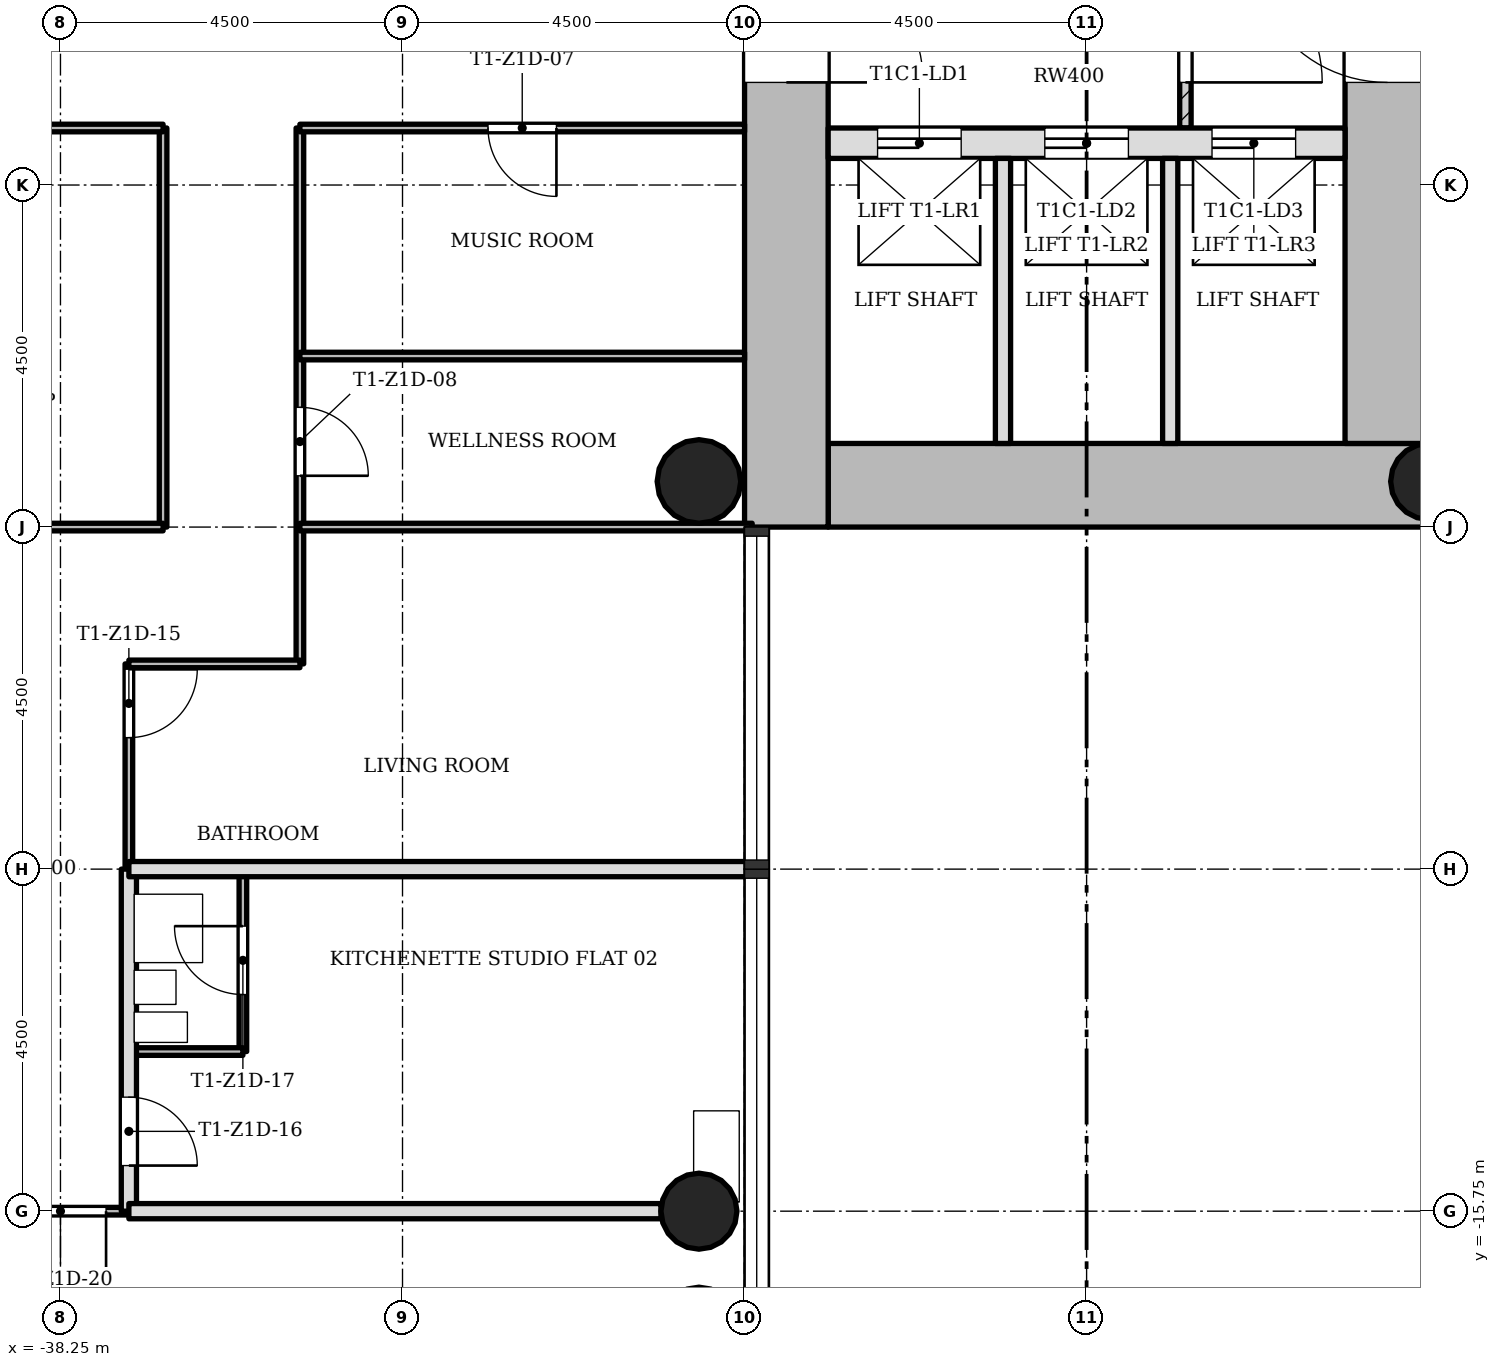
"""IFC4 building model, lengths in metres.
Left out: names, types, materials, properties, quantities, classifications, styles, units other than length and angle.
Written with IfcOpenShell. Run it as: python <this file> out.ifc"""

import sys

from ifc_helpers import new_model, si_unit, direction, frame, frame_2d, origin, origin_2d, place, context, subcontext, project, spatial, rectangle, hollow_circle, extrude, element, fill, save


model = new_model("IFC4")
c1 = context("Model", 3, precision=1e-05, world=origin(), true_north=direction((0.0, 1.0)))
c2 = subcontext(c1, "Body", "Model", "MODEL_VIEW")
j1 = project(units=[si_unit("LENGTHUNIT", "METRE"), si_unit("PLANEANGLEUNIT", "RADIAN")], contexts=[c1])
p1 = place(None, origin())
s1 = spatial("IfcSite", under=j1, at=p1, CompositionType="ELEMENT")
p2 = place(p1, origin())
s2 = spatial("IfcBuilding", under=s1, at=p2, CompositionType="ELEMENT")
p3 = place(p2, frame((0.0, 0.0, 61.9)))
s3 = spatial("IfcBuildingStorey", under=s2, at=p3, CompositionType="ELEMENT", Elevation=61.9)
p4 = place(p3, frame((-28.15, -6.2, 0.0), z_axis=(0.0, 0.0, 1.0), x_axis=(1.0, 0.0, 0.0)))
e1 = element("IfcWall", 1, at=p4, inside=s3, PredefinedType="SHEAR", context=c2, shape_type="SweptSolid", body=[
    extrude(rectangle(XDim=7.9, YDim=1.1, at=frame_2d((3.95, 0.0))), origin(), (0.0, 0.0, 1.0), 3.4),
])
p5 = place(p3, frame((-20.8, -5.65, 0.0), z_axis=(0.0, 0.0, 1.0), x_axis=(0.0, 1.0, 0.0)))
e2 = element("IfcWall", 2, at=p5, inside=s3, PredefinedType="SHEAR", context=c2, shape_type="SweptSolid", body=[
    extrude(rectangle(XDim=12.4, YDim=1.1, at=frame_2d((6.2, 0.0))), origin(), (0.0, 0.0, 1.0), 3.4),
])
p6 = place(p5, frame((4.75, 0.0, 0.0)))
e3 = element("IfcOpeningElement", 3, at=p6, cuts=e2, PredefinedType="OPENING", context=c2, shape_type="SweptSolid", body=[
    extrude(rectangle(XDim=1.8, YDim=2.1, at=frame_2d((0.9, 1.05))), frame((0.0, 0.56, 0.0), z_axis=(0.0, -1.0, 0.0), x_axis=(1.0, 0.0, 0.0)), (0.0, 0.0, 1.0), 1.12),
])
p7 = place(p3, frame((-28.7, 5.65, 0.0), z_axis=(0.0, 0.0, 1.0), x_axis=(0.0, -1.0, 0.0)))
e4 = element("IfcWall", 4, at=p7, inside=s3, PredefinedType="SHEAR", context=c2, shape_type="SweptSolid", body=[
    extrude(rectangle(XDim=12.4, YDim=1.1, at=frame_2d((6.2, 0.0))), origin(), (0.0, 0.0, 1.0), 3.4),
])
p8 = place(p7, frame((4.75, 0.0, 0.0)))
e5 = element("IfcOpeningElement", 5, at=p8, cuts=e4, PredefinedType="OPENING", context=c2, shape_type="SweptSolid", body=[
    extrude(rectangle(XDim=1.8, YDim=2.1, at=frame_2d((0.9, 1.05))), frame((0.0, 0.56, 0.0), z_axis=(0.0, -1.0, 0.0), x_axis=(1.0, 0.0, 0.0)), (0.0, 0.0, 1.0), 1.12),
])
p9 = place(p3, frame((-28.15, -1.7, 0.0), z_axis=(0.0, 0.0, 1.0), x_axis=(1.0, 0.0, 0.0)))
e6 = element("IfcWall", 6, at=p9, inside=s3, PredefinedType="SHEAR", context=c2, shape_type="SweptSolid", body=[
    extrude(rectangle(XDim=6.8, YDim=0.4, at=frame_2d((3.4, 0.0))), origin(), (0.0, 0.0, 1.0), 3.4),
])
p10 = place(p9, frame((0.65, 0.0, 0.0)))
e7 = element("IfcOpeningElement", 7, at=p10, cuts=e6, PredefinedType="OPENING", context=c2, shape_type="SweptSolid", body=[
    extrude(rectangle(XDim=1.1, YDim=2.1, at=frame_2d((0.55, 1.05))), frame((0.0, 0.21, 0.0), z_axis=(0.0, -1.0, 0.0), x_axis=(1.0, 0.0, 0.0)), (0.0, 0.0, 1.0), 0.42),
])
p11 = place(p9, frame((2.85, 0.0, 0.0)))
e8 = element("IfcOpeningElement", 8, at=p11, cuts=e6, PredefinedType="OPENING", context=c2, shape_type="SweptSolid", body=[
    extrude(rectangle(XDim=1.1, YDim=2.1, at=frame_2d((0.55, 1.05))), frame((0.0, 0.21, 0.0), z_axis=(0.0, -1.0, 0.0), x_axis=(1.0, 0.0, 0.0)), (0.0, 0.0, 1.0), 0.42),
])
p12 = place(p9, frame((5.05, 0.0, 0.0)))
e9 = element("IfcOpeningElement", 9, at=p12, cuts=e6, PredefinedType="OPENING", context=c2, shape_type="SweptSolid", body=[
    extrude(rectangle(XDim=1.1, YDim=2.1, at=frame_2d((0.55, 1.05))), frame((0.0, 0.21, 0.0), z_axis=(0.0, -1.0, 0.0), x_axis=(1.0, 0.0, 0.0)), (0.0, 0.0, 1.0), 0.42),
])
for number, where, z_axis, x_axis in (
    (10, (-20.25, -6.15, 0.0), (0.0, 0.0, 1.0), (1.0, 0.0, 0.0)),
    (11, (-29.85, -15.75, 0.0), (0.0, 0.0, 1.0), (1.0, 0.0, 0.0)),
):
    element("IfcColumn", number, at=place(p3, frame(where, z_axis=z_axis, x_axis=x_axis)), inside=s3, PredefinedType="COLUMN", context=c2, shape_type="SweptSolid", body=[
        extrude(hollow_circle(Radius=0.5, WallThickness=0.036, at=origin_2d()), origin(), (0.0, 0.0, 1.0), 3.4),
    ])
p13 = place(p3, frame((-29.85, -6.15, 0.0), z_axis=(0.0, 0.0, 1.0), x_axis=(1.0, 0.0, 0.0)))
e12 = element("IfcColumn", 12, at=p13, inside=s3, PredefinedType="COLUMN", context=c2, shape_type="SweptSolid", body=[
    extrude(hollow_circle(Radius=0.55, WallThickness=0.04, at=origin_2d()), origin(), (0.0, 0.0, 1.0), 3.4),
])
p14 = place(p3, frame((-23.45, -1.5, 0.0), z_axis=(0.0, 0.0, 1.0), x_axis=(0.0, 1.0, 0.0)))
e13 = element("IfcWall", 13, at=p14, inside=s3, PredefinedType="PARTITIONING", context=c2, shape_type="SweptSolid", body=[
    extrude(rectangle(XDim=3.0, YDim=0.15, at=frame_2d((1.5, 0.0))), origin(), (0.0, 0.0, 1.0), 3.0),
])
p15 = place(p14, frame((0.6, 0.0, 0.0)))
e14 = element("IfcOpeningElement", 14, at=p15, cuts=e13, PredefinedType="OPENING", context=c2, shape_type="SweptSolid", body=[
    extrude(rectangle(XDim=1.8, YDim=2.1, at=frame_2d((0.9, 1.05))), frame((0.0, 0.085, 0.0), z_axis=(0.0, -1.0, 0.0), x_axis=(1.0, 0.0, 0.0)), (0.0, 0.0, 1.0), 0.17),
])
for number, where, z_axis, x_axis in (
    (15, (-25.85, -5.65, 0.0), (0.0, 0.0, 1.0), (0.0, 1.0, 0.0)),
    (16, (-23.65, -5.65, 0.0), (0.0, 0.0, 1.0), (0.0, 1.0, 0.0)),
):
    element("IfcWall", number, at=place(p3, frame(where, z_axis=z_axis, x_axis=x_axis)), inside=s3, PredefinedType="SOLIDWALL", context=c2, shape_type="SweptSolid", body=[
        extrude(rectangle(XDim=3.75, YDim=0.2, at=frame_2d((1.875, 0.0))), origin(), (0.0, 0.0, 1.0), 3.0),
    ])
p16 = place(p3, frame((-37.35, -11.25, 0.0), z_axis=(0.0, 0.0, 1.0), x_axis=(0.0, 1.0, 0.0)))
e17 = element("IfcWall", 17, at=p16, inside=s3, PredefinedType="PARTITIONING", context=c2, shape_type="SweptSolid", body=[
    extrude(rectangle(XDim=2.7, YDim=0.1, at=frame_2d((1.35, 0.0))), origin(), (0.0, 0.0, 1.0), 3.0),
])
p17 = place(p16, frame((1.73, 0.0, 0.0)))
e18 = element("IfcOpeningElement", 18, at=p17, cuts=e17, PredefinedType="OPENING", context=c2, shape_type="SweptSolid", body=[
    extrude(rectangle(XDim=0.9, YDim=2.1, at=frame_2d((0.45, 1.05))), frame((0.0, 0.06, 0.0), z_axis=(0.0, -1.0, 0.0), x_axis=(1.0, 0.0, 0.0)), (0.0, 0.0, 1.0), 0.12),
])
p18 = place(p3, frame((-37.35, -15.75, 0.0), z_axis=(0.0, 0.0, 1.0), x_axis=(0.0, 1.0, 0.0)))
e19 = element("IfcWall", 19, at=p18, inside=s3, PredefinedType="SOLIDWALL", context=c2, shape_type="SweptSolid", body=[
    extrude(rectangle(XDim=4.5, YDim=0.2, at=frame_2d((2.25, 0.0))), origin(), (0.0, 0.0, 1.0), 3.0),
])
p19 = place(p18, frame((0.6, 0.0, 0.0)))
e20 = element("IfcOpeningElement", 20, at=p19, cuts=e19, PredefinedType="OPENING", context=c2, shape_type="SweptSolid", body=[
    extrude(rectangle(XDim=0.9, YDim=2.1, at=frame_2d((0.45, 1.05))), frame((0.0, 0.11, 0.0), z_axis=(0.0, -1.0, 0.0), x_axis=(1.0, 0.0, 0.0)), (0.0, 0.0, 1.0), 0.22),
])
p20 = place(p3, frame((-36.9, -6.75, 0.0), z_axis=(0.0, 0.0, 1.0), x_axis=(0.0, 1.0, 0.0)))
e21 = element("IfcWall", 21, at=p20, inside=s3, PredefinedType="PARTITIONING", context=c2, shape_type="SweptSolid", body=[
    extrude(rectangle(XDim=5.25, YDim=0.1, at=frame_2d((2.625, 0.0))), origin(), (0.0, 0.0, 1.0), 3.0),
])
p21 = place(p3, frame((-35.85, -13.65, 0.0), z_axis=(0.0, 0.0, 1.0), x_axis=(0.0, 1.0, 0.0)))
e22 = element("IfcWall", 22, at=p21, inside=s3, PredefinedType="PARTITIONING", context=c2, shape_type="SweptSolid", body=[
    extrude(rectangle(XDim=2.4, YDim=0.1, at=frame_2d((1.2, 0.0))), origin(), (0.0, 0.0, 1.0), 3.0),
])
p22 = place(p21, frame((0.75, 0.0, 0.0)))
e23 = element("IfcOpeningElement", 23, at=p22, cuts=e22, PredefinedType="OPENING", context=c2, shape_type="SweptSolid", body=[
    extrude(rectangle(XDim=0.9, YDim=2.1, at=frame_2d((0.45, 1.05))), frame((0.0, 0.06, 0.0), z_axis=(0.0, -1.0, 0.0), x_axis=(1.0, 0.0, 0.0)), (0.0, 0.0, 1.0), 0.12),
])
p23 = place(p3, frame((-35.1, -8.55, 0.0), z_axis=(0.0, 0.0, 1.0), x_axis=(0.0, 1.0, 0.0)))
e24 = element("IfcWall", 24, at=p23, inside=s3, PredefinedType="PARTITIONING", context=c2, shape_type="SweptSolid", body=[
    extrude(rectangle(XDim=7.05, YDim=0.1, at=frame_2d((3.525, 0.0))), origin(), (0.0, 0.0, 1.0), 3.0),
])
p24 = place(p23, frame((2.475, 0.0, 0.0)))
e25 = element("IfcOpeningElement", 25, at=p24, cuts=e24, PredefinedType="OPENING", context=c2, shape_type="SweptSolid", body=[
    extrude(rectangle(XDim=0.9, YDim=2.1, at=frame_2d((0.45, 1.05))), frame((0.0, 0.06, 0.0), z_axis=(0.0, -1.0, 0.0), x_axis=(1.0, 0.0, 0.0)), (0.0, 0.0, 1.0), 0.12),
])
p25 = place(p3, frame((-41.65, -15.75, 0.0), z_axis=(0.0, 0.0, 1.0), x_axis=(1.0, 0.0, 0.0)))
e26 = element("IfcWall", 26, at=p25, inside=s3, PredefinedType="PARTITIONING", context=c2, shape_type="SweptSolid", body=[
    extrude(rectangle(XDim=4.3, YDim=0.1, at=frame_2d((2.15, 0.0))), origin(), (0.0, 0.0, 1.0), 3.0),
])
p26 = place(p25, frame((2.8, 0.0, 0.0)))
e27 = element("IfcOpeningElement", 27, at=p26, cuts=e26, PredefinedType="OPENING", context=c2, shape_type="SweptSolid", body=[
    extrude(rectangle(XDim=1.2, YDim=2.1, at=frame_2d((0.6, 1.05))), frame((0.0, 0.06, 0.0), z_axis=(0.0, -1.0, 0.0), x_axis=(1.0, 0.0, 0.0)), (0.0, 0.0, 1.0), 0.12),
])
p27 = place(p3, frame((-37.35, -15.75, 0.0), z_axis=(0.0, 0.0, 1.0), x_axis=(1.0, 0.0, 0.0)))
e28 = element("IfcWall", 28, at=p27, inside=s3, PredefinedType="SOLIDWALL", context=c2, shape_type="SweptSolid", body=[
    extrude(rectangle(XDim=7.0, YDim=0.2, at=frame_2d((3.5, 0.0))), origin(), (0.0, 0.0, 1.0), 3.0),
])
p28 = place(p3, frame((-37.35, -13.65, 0.0), z_axis=(0.0, 0.0, 1.0), x_axis=(1.0, 0.0, 0.0)))
e29 = element("IfcWall", 29, at=p28, inside=s3, PredefinedType="PARTITIONING", context=c2, shape_type="SweptSolid", body=[
    extrude(rectangle(XDim=1.5, YDim=0.1, at=frame_2d((0.75, 0.0))), origin(), (0.0, 0.0, 1.0), 3.0),
])
p29 = place(p3, frame((-37.35, -11.25, 0.0), z_axis=(0.0, 0.0, 1.0), x_axis=(1.0, 0.0, 0.0)))
e30 = element("IfcWall", 30, at=p29, inside=s3, PredefinedType="SOLIDWALL", context=c2, shape_type="SweptSolid", body=[
    extrude(rectangle(XDim=8.2, YDim=0.2, at=frame_2d((4.1, 0.0))), origin(), (0.0, 0.0, 1.0), 3.0),
])
p30 = place(p3, frame((-37.35, -8.55, 0.0), z_axis=(0.0, 0.0, 1.0), x_axis=(1.0, 0.0, 0.0)))
e31 = element("IfcWall", 31, at=p30, inside=s3, PredefinedType="PARTITIONING", context=c2, shape_type="SweptSolid", body=[
    extrude(rectangle(XDim=2.25, YDim=0.1, at=frame_2d((1.125, 0.0))), origin(), (0.0, 0.0, 1.0), 3.0),
])
for number, where, z_axis, x_axis in (
    (32, (-42.85, -6.75, 0.0), (0.0, 0.0, 1.0), (1.0, 0.0, 0.0)),
    (33, (-35.1, -6.75, 0.0), (0.0, 0.0, 1.0), (1.0, 0.0, 0.0)),
):
    element("IfcWall", number, at=place(p3, frame(where, z_axis=z_axis, x_axis=x_axis)), inside=s3, PredefinedType="PARTITIONING", context=c2, shape_type="SweptSolid", body=[
        extrude(rectangle(XDim=5.95, YDim=0.1, at=frame_2d((2.975, 0.0))), origin(), (0.0, 0.0, 1.0), 3.0),
    ])
p31 = place(p3, frame((-35.1, -4.5, 0.0), z_axis=(0.0, 0.0, 1.0), x_axis=(1.0, 0.0, 0.0)))
e34 = element("IfcWall", 34, at=p31, inside=s3, PredefinedType="PARTITIONING", context=c2, shape_type="SweptSolid", body=[
    extrude(rectangle(XDim=5.85, YDim=0.1, at=frame_2d((2.925, 0.0))), origin(), (0.0, 0.0, 1.0), 3.0),
])
p32 = place(p3, frame((-42.75, -1.5, 0.0), z_axis=(0.0, 0.0, 1.0), x_axis=(1.0, 0.0, 0.0)))
e35 = element("IfcWall", 35, at=p32, inside=s3, PredefinedType="PARTITIONING", context=c2, shape_type="SweptSolid", body=[
    extrude(rectangle(XDim=5.85, YDim=0.1, at=frame_2d((2.925, 0.0))), origin(), (0.0, 0.0, 1.0), 3.0),
])
p33 = place(p32, frame((2.475, 0.0, 0.0)))
e36 = element("IfcOpeningElement", 36, at=p33, cuts=e35, PredefinedType="OPENING", context=c2, shape_type="SweptSolid", body=[
    extrude(rectangle(XDim=0.9, YDim=2.1, at=frame_2d((0.45, 1.05))), frame((0.0, 0.06, 0.0), z_axis=(0.0, -1.0, 0.0), x_axis=(1.0, 0.0, 0.0)), (0.0, 0.0, 1.0), 0.12),
])
p34 = place(p3, frame((-35.1, -1.5, 0.0), z_axis=(0.0, 0.0, 1.0), x_axis=(1.0, 0.0, 0.0)))
e37 = element("IfcWall", 37, at=p34, inside=s3, PredefinedType="PARTITIONING", context=c2, shape_type="SweptSolid", body=[
    extrude(rectangle(XDim=5.85, YDim=0.1, at=frame_2d((2.925, 0.0))), origin(), (0.0, 0.0, 1.0), 3.0),
])
p35 = place(p34, frame((2.475, 0.0, 0.0)))
e38 = element("IfcOpeningElement", 38, at=p35, cuts=e37, PredefinedType="OPENING", context=c2, shape_type="SweptSolid", body=[
    extrude(rectangle(XDim=0.9, YDim=2.1, at=frame_2d((0.45, 1.05))), frame((0.0, 0.06, 0.0), z_axis=(0.0, -1.0, 0.0), x_axis=(1.0, 0.0, 0.0)), (0.0, 0.0, 1.0), 0.12),
])
p36 = place(p15, origin())
e39 = element("IfcDoor", 39, at=p36, inside=s3, OperationType="SINGLE_SWING_LEFT", PredefinedType="DOOR", context=c2, shape_type="SweptSolid", body=[
    extrude(rectangle(XDim=1.8, YDim=2.1, at=frame_2d((0.9, 1.05))), frame((0.0, 0.025, 0.0), z_axis=(0.0, -1.0, 0.0), x_axis=(1.0, 0.0, 0.0)), (0.0, 0.0, 1.0), 0.05),
])
fill(e14, e39)
p37 = place(p35, origin())
e40 = element("IfcDoor", 40, at=p37, inside=s3, OperationType="SINGLE_SWING_RIGHT", PredefinedType="DOOR", context=c2, shape_type="SweptSolid", body=[
    extrude(rectangle(XDim=0.9, YDim=2.1, at=frame_2d((0.45, 1.05))), frame((0.0, 0.025, 0.0), z_axis=(0.0, -1.0, 0.0), x_axis=(1.0, 0.0, 0.0)), (0.0, 0.0, 1.0), 0.05),
])
fill(e38, e40)
p38 = place(p24, origin())
e41 = element("IfcDoor", 41, at=p38, inside=s3, OperationType="SINGLE_SWING_LEFT", PredefinedType="DOOR", context=c2, shape_type="SweptSolid", body=[
    extrude(rectangle(XDim=0.9, YDim=2.1, at=frame_2d((0.45, 1.05))), frame((0.0, 0.025, 0.0), z_axis=(0.0, -1.0, 0.0), x_axis=(1.0, 0.0, 0.0)), (0.0, 0.0, 1.0), 0.05),
])
fill(e25, e41)
p39 = place(p17, origin())
e42 = element("IfcDoor", 42, at=p39, inside=s3, OperationType="SINGLE_SWING_RIGHT", PredefinedType="DOOR", context=c2, shape_type="SweptSolid", body=[
    extrude(rectangle(XDim=0.9, YDim=2.1, at=frame_2d((0.45, 1.05))), frame((0.0, 0.025, 0.0), z_axis=(0.0, -1.0, 0.0), x_axis=(1.0, 0.0, 0.0)), (0.0, 0.0, 1.0), 0.05),
])
fill(e18, e42)
p40 = place(p19, origin())
e43 = element("IfcDoor", 43, at=p40, inside=s3, OperationType="SINGLE_SWING_LEFT", PredefinedType="DOOR", context=c2, shape_type="SweptSolid", body=[
    extrude(rectangle(XDim=0.9, YDim=2.1, at=frame_2d((0.45, 1.05))), frame((0.0, 0.025, 0.0), z_axis=(0.0, -1.0, 0.0), x_axis=(1.0, 0.0, 0.0)), (0.0, 0.0, 1.0), 0.05),
])
fill(e20, e43)
p41 = place(p22, origin())
e44 = element("IfcDoor", 44, at=p41, inside=s3, OperationType="SINGLE_SWING_LEFT", PredefinedType="DOOR", context=c2, shape_type="SweptSolid", body=[
    extrude(rectangle(XDim=0.9, YDim=2.1, at=frame_2d((0.45, 1.05))), frame((0.0, 0.025, 0.0), z_axis=(0.0, -1.0, 0.0), x_axis=(1.0, 0.0, 0.0)), (0.0, 0.0, 1.0), 0.05),
])
fill(e23, e44)
p42 = place(p26, origin())
e45 = element("IfcDoor", 45, at=p42, inside=s3, OperationType="SINGLE_SWING_RIGHT", PredefinedType="DOOR", context=c2, shape_type="SweptSolid", body=[
    extrude(rectangle(XDim=1.2, YDim=2.1, at=frame_2d((0.6, 1.05))), frame((0.0, 0.025, 0.0), z_axis=(0.0, -1.0, 0.0), x_axis=(1.0, 0.0, 0.0)), (0.0, 0.0, 1.0), 0.05),
])
fill(e27, e45)
p43 = place(p10, origin())
e46 = element("IfcDoor", 46, at=p43, inside=s3, OperationType="SLIDING_TO_LEFT", PredefinedType="DOOR", context=c2, shape_type="SweptSolid", body=[
    extrude(rectangle(XDim=1.1, YDim=2.1, at=frame_2d((0.55, 1.05))), frame((0.0, 0.025, 0.0), z_axis=(0.0, -1.0, 0.0), x_axis=(1.0, 0.0, 0.0)), (0.0, 0.0, 1.0), 0.05),
])
fill(e7, e46)
p44 = place(p11, origin())
e47 = element("IfcDoor", 47, at=p44, inside=s3, OperationType="SLIDING_TO_LEFT", PredefinedType="DOOR", context=c2, shape_type="SweptSolid", body=[
    extrude(rectangle(XDim=1.1, YDim=2.1, at=frame_2d((0.55, 1.05))), frame((0.0, 0.025, 0.0), z_axis=(0.0, -1.0, 0.0), x_axis=(1.0, 0.0, 0.0)), (0.0, 0.0, 1.0), 0.05),
])
fill(e8, e47)
p45 = place(p12, origin())
e48 = element("IfcDoor", 48, at=p45, inside=s3, OperationType="SLIDING_TO_LEFT", PredefinedType="DOOR", context=c2, shape_type="SweptSolid", body=[
    extrude(rectangle(XDim=1.1, YDim=2.1, at=frame_2d((0.55, 1.05))), frame((0.0, 0.025, 0.0), z_axis=(0.0, -1.0, 0.0), x_axis=(1.0, 0.0, 0.0)), (0.0, 0.0, 1.0), 0.05),
])
fill(e9, e48)
p46 = place(p8, origin())
e49 = element("IfcDoor", 49, at=p46, inside=s3, OperationType="SINGLE_SWING_LEFT", PredefinedType="DOOR", context=c2, shape_type="SweptSolid", body=[
    extrude(rectangle(XDim=1.8, YDim=2.1, at=frame_2d((0.9, 1.05))), frame((0.0, 0.025, 0.0), z_axis=(0.0, -1.0, 0.0), x_axis=(1.0, 0.0, 0.0)), (0.0, 0.0, 1.0), 0.05),
])
fill(e5, e49)
p47 = place(p6, origin())
e50 = element("IfcDoor", 50, at=p47, inside=s3, OperationType="SINGLE_SWING_LEFT", PredefinedType="DOOR", context=c2, shape_type="SweptSolid", body=[
    extrude(rectangle(XDim=1.8, YDim=2.1, at=frame_2d((0.9, 1.05))), frame((0.0, 0.025, 0.0), z_axis=(0.0, -1.0, 0.0), x_axis=(1.0, 0.0, 0.0)), (0.0, 0.0, 1.0), 0.05),
])
fill(e3, e50)
save(model, sys.argv[1])
